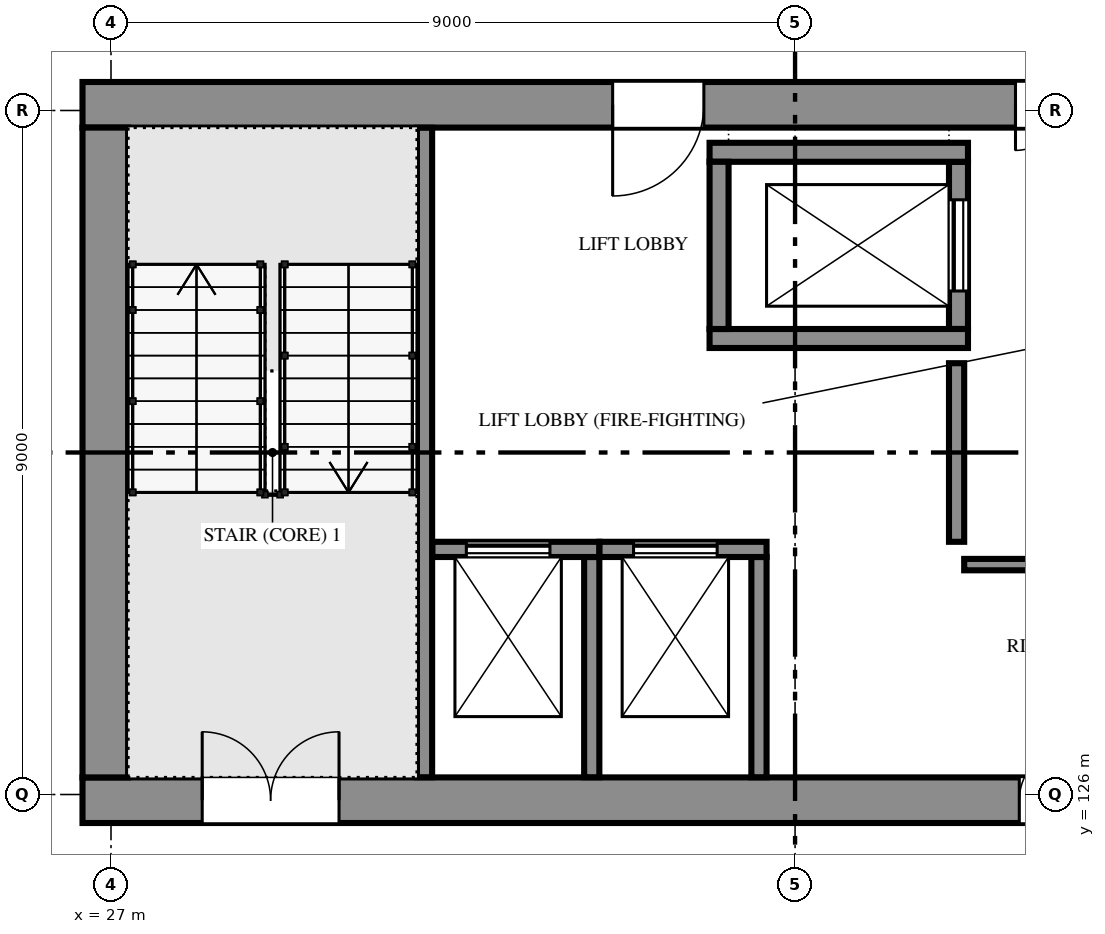
"""IFC4 building model, lengths in metres.
Left out: names, types, materials, properties, quantities, classifications, styles, units other than length and angle.
Written with IfcOpenShell. Run it as: python <this file> out.ifc"""

import sys

from ifc_helpers import new_model, si_unit, direction, frame, frame_2d, origin, place, context, subcontext, project, spatial, polyline, rectangle, outline, extrude, element, fill, save


model = new_model("IFC4")
c1 = context("Model", 3, precision=1e-05, world=origin(), true_north=direction((0.0, 1.0)))
c2 = subcontext(c1, "Body", "Model", "MODEL_VIEW")
j1 = project(units=[si_unit("LENGTHUNIT", "METRE"), si_unit("PLANEANGLEUNIT", "RADIAN")], contexts=[c1])
p1 = place(None, origin())
s1 = spatial("IfcSite", under=j1, at=p1, CompositionType="ELEMENT")
p2 = place(p1, origin())
s2 = spatial("IfcBuilding", under=s1, at=p2, CompositionType="ELEMENT")
p3 = place(p2, origin())
s3 = spatial("IfcBuildingStorey", under=s2, at=p3, CompositionType="ELEMENT", Elevation=0.0)
p4 = place(p3, frame((26.625, 125.925, -2.1), z_axis=(0.0, 0.0, 1.0), x_axis=(1.0, 0.0, 0.0)))
e1 = element("IfcWall", 1, at=p4, inside=s3, PredefinedType="SOLIDWALL", context=c2, shape_type="SweptSolid", body=[
    extrude(rectangle(XDim=18.75, YDim=0.6, at=frame_2d((9.375, 0.0))), origin(), (0.0, 0.0, 1.0), 9.6),
])
p5 = place(p4, frame((1.575, 0.0, 2.1)))
e2 = element("IfcOpeningElement", 2, at=p5, cuts=e1, PredefinedType="OPENING", context=c2, shape_type="SweptSolid", body=[
    extrude(rectangle(XDim=1.8, YDim=2.1, at=frame_2d((0.9, 1.05))), frame((0.0, 0.31, 0.0), z_axis=(0.0, -1.0, 0.0), x_axis=(1.0, 0.0, 0.0)), (0.0, 0.0, 1.0), 0.62),
])
p6 = place(p4, frame((12.325, 0.0, 2.1)))
e3 = element("IfcOpeningElement", 3, at=p6, cuts=e1, PredefinedType="OPENING", context=c2, shape_type="SweptSolid", body=[
    extrude(rectangle(XDim=0.7, YDim=2.0, at=frame_2d((0.35, 1.0))), frame((0.0, 0.31, 0.0), z_axis=(0.0, -1.0, 0.0), x_axis=(1.0, 0.0, 0.0)), (0.0, 0.0, 1.0), 0.62),
])
p7 = place(p3, frame((26.625, 135.075, -2.1), z_axis=(0.0, 0.0, 1.0), x_axis=(1.0, 0.0, 0.0)))
e4 = element("IfcWall", 4, at=p7, inside=s3, PredefinedType="SOLIDWALL", context=c2, shape_type="SweptSolid", body=[
    extrude(rectangle(XDim=18.75, YDim=0.6, at=frame_2d((9.375, 0.0))), origin(), (0.0, 0.0, 1.0), 9.6),
])
p8 = place(p7, frame((15.375, 0.0, 2.1)))
e5 = element("IfcOpeningElement", 5, at=p8, cuts=e4, PredefinedType="OPENING", context=c2, shape_type="SweptSolid", body=[
    extrude(rectangle(XDim=1.8, YDim=2.1, at=frame_2d((0.9, 1.05))), frame((0.0, 0.31, 0.0), z_axis=(0.0, -1.0, 0.0), x_axis=(1.0, 0.0, 0.0)), (0.0, 0.0, 1.0), 0.62),
])
p9 = place(p7, frame((6.975, 0.0, 2.1)))
e6 = element("IfcOpeningElement", 6, at=p9, cuts=e4, PredefinedType="OPENING", context=c2, shape_type="SweptSolid", body=[
    extrude(rectangle(XDim=1.2, YDim=2.1, at=frame_2d((0.6, 1.05))), frame((0.0, 0.31, 0.0), z_axis=(0.0, -1.0, 0.0), x_axis=(1.0, 0.0, 0.0)), (0.0, 0.0, 1.0), 0.62),
])
p10 = place(p7, frame((12.275, 0.0, 2.1)))
e7 = element("IfcOpeningElement", 7, at=p10, cuts=e4, PredefinedType="OPENING", context=c2, shape_type="SweptSolid", body=[
    extrude(rectangle(XDim=1.2, YDim=2.1, at=frame_2d((0.6, 1.05))), frame((0.0, 0.31, 0.0), z_axis=(0.0, -1.0, 0.0), x_axis=(1.0, 0.0, 0.0)), (0.0, 0.0, 1.0), 0.62),
])
p11 = place(p3, frame((26.925, 126.225, -2.1), z_axis=(0.0, 0.0, 1.0), x_axis=(0.0, 1.0, 0.0)))
e8 = element("IfcWall", 8, at=p11, inside=s3, PredefinedType="SOLIDWALL", context=c2, shape_type="SweptSolid", body=[
    extrude(rectangle(XDim=8.55, YDim=0.6, at=frame_2d((4.275, 0.0))), origin(), (0.0, 0.0, 1.0), 9.6),
])
p12 = place(p3, frame((31.125, 126.227, 0.0), z_axis=(0.0, 0.0, 1.0), x_axis=(0.0, 1.0, 0.0)))
e9 = element("IfcWall", 9, at=p12, inside=s3, PredefinedType="SOLIDWALL", context=c2, shape_type="SweptSolid", body=[
    extrude(rectangle(XDim=8.546, YDim=0.2, at=frame_2d((4.273, 0.0))), origin(), (0.0, 0.0, 1.0), 6.836),
])
p13 = place(p3, frame((31.227, 129.225, -1.6), z_axis=(0.0, 0.0, 1.0), x_axis=(1.0, 0.0, 0.0)))
e10 = element("IfcWall", 10, at=p13, inside=s3, PredefinedType="SOLIDWALL", context=c2, shape_type="SweptSolid", body=[
    extrude(rectangle(XDim=2.198, YDim=0.2, at=frame_2d((1.099, 0.0))), origin(), (0.0, 0.0, 1.0), 8.357),
])
p14 = place(p13, frame((0.448, 0.0, 1.6)))
e11 = element("IfcOpeningElement", 11, at=p14, cuts=e10, PredefinedType="OPENING", context=c2, shape_type="SweptSolid", body=[
    extrude(rectangle(XDim=1.1, YDim=2.1, at=frame_2d((0.55, 1.05))), frame((0.0, 0.11, 0.0), z_axis=(0.0, -1.0, 0.0), x_axis=(1.0, 0.0, 0.0)), (0.0, 0.0, 1.0), 0.22),
])
p15 = place(p3, frame((33.325, 126.227, -1.6), z_axis=(0.0, 0.0, 1.0), x_axis=(0.0, 1.0, 0.0)))
e12 = element("IfcWall", 12, at=p15, inside=s3, PredefinedType="SOLIDWALL", context=c2, shape_type="SweptSolid", body=[
    extrude(rectangle(XDim=2.898, YDim=0.2, at=frame_2d((1.449, 0.0))), origin(), (0.0, 0.0, 1.0), 8.357),
])
p16 = place(p3, frame((33.427, 129.225, -1.6), z_axis=(0.0, 0.0, 1.0), x_axis=(1.0, 0.0, 0.0)))
e13 = element("IfcWall", 13, at=p16, inside=s3, PredefinedType="SOLIDWALL", context=c2, shape_type="SweptSolid", body=[
    extrude(rectangle(XDim=2.198, YDim=0.2, at=frame_2d((1.099, 0.0))), origin(), (0.0, 0.0, 1.0), 8.357),
])
p17 = place(p16, frame((0.448, 0.0, 1.6)))
e14 = element("IfcOpeningElement", 14, at=p17, cuts=e13, PredefinedType="OPENING", context=c2, shape_type="SweptSolid", body=[
    extrude(rectangle(XDim=1.1, YDim=2.1, at=frame_2d((0.55, 1.05))), frame((0.0, 0.11, 0.0), z_axis=(0.0, -1.0, 0.0), x_axis=(1.0, 0.0, 0.0)), (0.0, 0.0, 1.0), 0.22),
])
p18 = place(p3, frame((35.525, 126.227, -1.6), z_axis=(0.0, 0.0, 1.0), x_axis=(0.0, 1.0, 0.0)))
e15 = element("IfcWall", 15, at=p18, inside=s3, PredefinedType="SOLIDWALL", context=c2, shape_type="SweptSolid", body=[
    extrude(rectangle(XDim=2.898, YDim=0.2, at=frame_2d((1.449, 0.0))), origin(), (0.0, 0.0, 1.0), 8.357),
])
for number, where, z_axis, x_axis in (
    (16, (34.875, 132.0, -1.6), (0.0, 0.0, 1.0), (1.0, 0.0, 0.0)),
    (17, (34.875, 134.45, -1.6), (0.0, 0.0, 1.0), (1.0, 0.0, 0.0)),
):
    element("IfcWall", number, at=place(p3, frame(where, z_axis=z_axis, x_axis=x_axis)), inside=s3, PredefinedType="SOLIDWALL", context=c2, shape_type="SweptSolid", body=[
        extrude(rectangle(XDim=3.4, YDim=0.25, at=frame_2d((1.7, 0.0))), origin(), (0.0, 0.0, 1.0), 8.436),
    ])
p19 = place(p3, frame((35.0, 132.125, -1.6), z_axis=(0.0, 0.0, 1.0), x_axis=(0.0, 1.0, 0.0)))
e18 = element("IfcWall", 18, at=p19, inside=s3, PredefinedType="SOLIDWALL", context=c2, shape_type="SweptSolid", body=[
    extrude(rectangle(XDim=2.2, YDim=0.25, at=frame_2d((1.1, 0.0))), origin(), (0.0, 0.0, 1.0), 8.436),
])
p20 = place(p3, frame((38.15, 132.125, -1.6), z_axis=(0.0, 0.0, 1.0), x_axis=(0.0, 1.0, 0.0)))
e19 = element("IfcWall", 19, at=p20, inside=s3, PredefinedType="SOLIDWALL", context=c2, shape_type="SweptSolid", body=[
    extrude(rectangle(XDim=2.2, YDim=0.25, at=frame_2d((1.1, 0.0))), origin(), (0.0, 0.0, 1.0), 8.436),
])
p21 = place(p20, frame((0.5, 0.0, 1.6)))
e20 = element("IfcOpeningElement", 20, at=p21, cuts=e19, PredefinedType="OPENING", context=c2, shape_type="SweptSolid", body=[
    extrude(rectangle(XDim=1.2, YDim=2.1, at=frame_2d((0.6, 1.05))), frame((0.0, 0.135, 0.0), z_axis=(0.0, -1.0, 0.0), x_axis=(1.0, 0.0, 0.0)), (0.0, 0.0, 1.0), 0.27),
])
p22 = place(p3, frame((38.125, 131.675, 0.0), z_axis=(0.0, 0.0, 1.0), x_axis=(0.0, -1.0, 0.0)))
e21 = element("IfcWall", 21, at=p22, inside=s3, PredefinedType="PARTITIONING", context=c2, shape_type="SweptSolid", body=[
    extrude(rectangle(XDim=2.35, YDim=0.2, at=frame_2d((1.175, 0.0))), origin(), (0.0, 0.0, 1.0), 6.6),
])
p23 = place(p3, frame((40.773, 129.025, 0.0), z_axis=(0.0, 0.0, 1.0), x_axis=(-1.0, 0.0, 0.0)))
e22 = element("IfcWall", 22, at=p23, inside=s3, PredefinedType="SOLIDWALL", context=c2, shape_type="SweptSolid", body=[
    extrude(rectangle(XDim=2.548, YDim=0.15, at=frame_2d((1.274, 0.0))), origin(), (0.0, 0.0, 1.0), 6.836),
])
p24 = place(p14, origin())
e23 = element("IfcDoor", 23, at=p24, inside=s3, OperationType="SLIDING_TO_LEFT", PredefinedType="DOOR", context=c2, shape_type="SweptSolid", body=[
    extrude(outline(polyline([(0.0, 0.0), (0.07, 0.0), (0.07, 2.03), (1.03, 2.03), (1.03, 0.0), (1.1, 0.0), (1.1, 2.1), (0.0, 2.1), (0.0, 0.0)])), frame((0.0, 0.025, 0.0), z_axis=(0.0, -1.0, 0.0), x_axis=(1.0, 0.0, 0.0)), (0.0, 0.0, 1.0), 0.05),
    extrude(rectangle(XDim=0.524, YDim=2.016, at=frame_2d((0.336, 1.018))), frame((0.0, 0.018, 0.0), z_axis=(0.0, -1.0, 0.0), x_axis=(1.0, 0.0, 0.0)), (0.0, 0.0, 1.0), 0.016),
    extrude(rectangle(XDim=0.52, YDim=2.016, at=frame_2d((0.766, 1.018))), frame((0.0, -0.002, 0.0), z_axis=(0.0, -1.0, 0.0), x_axis=(1.0, 0.0, 0.0)), (0.0, 0.0, 1.0), 0.016),
])
fill(e11, e23)
p25 = place(p17, origin())
e24 = element("IfcDoor", 24, at=p25, inside=s3, OperationType="SLIDING_TO_LEFT", PredefinedType="DOOR", context=c2, shape_type="SweptSolid", body=[
    extrude(outline(polyline([(0.0, 0.0), (0.07, 0.0), (0.07, 2.03), (1.03, 2.03), (1.03, 0.0), (1.1, 0.0), (1.1, 2.1), (0.0, 2.1), (0.0, 0.0)])), frame((0.0, 0.025, 0.0), z_axis=(0.0, -1.0, 0.0), x_axis=(1.0, 0.0, 0.0)), (0.0, 0.0, 1.0), 0.05),
    extrude(rectangle(XDim=0.524, YDim=2.016, at=frame_2d((0.336, 1.018))), frame((0.0, 0.018, 0.0), z_axis=(0.0, -1.0, 0.0), x_axis=(1.0, 0.0, 0.0)), (0.0, 0.0, 1.0), 0.016),
    extrude(rectangle(XDim=0.52, YDim=2.016, at=frame_2d((0.766, 1.018))), frame((0.0, -0.002, 0.0), z_axis=(0.0, -1.0, 0.0), x_axis=(1.0, 0.0, 0.0)), (0.0, 0.0, 1.0), 0.016),
])
fill(e14, e24)
p26 = place(p21, origin())
e25 = element("IfcDoor", 25, at=p26, inside=s3, OperationType="SLIDING_TO_LEFT", PredefinedType="DOOR", context=c2, shape_type="SweptSolid", body=[
    extrude(outline(polyline([(0.0, 0.0), (0.07, 0.0), (0.07, 2.03), (1.13, 2.03), (1.13, 0.0), (1.2, 0.0), (1.2, 2.1), (0.0, 2.1), (0.0, 0.0)])), frame((0.0, 0.025, 0.0), z_axis=(0.0, -1.0, 0.0), x_axis=(1.0, 0.0, 0.0)), (0.0, 0.0, 1.0), 0.05),
    extrude(rectangle(XDim=0.579, YDim=2.016, at=frame_2d((0.363, 1.018))), frame((0.0, 0.018, 0.0), z_axis=(0.0, -1.0, 0.0), x_axis=(1.0, 0.0, 0.0)), (0.0, 0.0, 1.0), 0.016),
    extrude(rectangle(XDim=0.575, YDim=2.016, at=frame_2d((0.839, 1.018))), frame((0.0, -0.002, 0.0), z_axis=(0.0, -1.0, 0.0), x_axis=(1.0, 0.0, 0.0)), (0.0, 0.0, 1.0), 0.016),
])
fill(e20, e25)
p27 = place(p5, origin())
e26 = element("IfcDoor", 26, at=p27, inside=s3, OperationType="DOUBLE_DOOR_SINGLE_SWING", PredefinedType="DOOR", context=c2, shape_type="SweptSolid", body=[
    extrude(outline(polyline([(0.0, 0.0), (0.07, 0.0), (0.07, 2.03), (1.73, 2.03), (1.73, 0.0), (1.8, 0.0), (1.8, 2.1), (0.0, 2.1), (0.0, 0.0)])), frame((0.0, 0.025, 0.0), z_axis=(0.0, -1.0, 0.0), x_axis=(1.0, 0.0, 0.0)), (0.0, 0.0, 1.0), 0.05),
    extrude(outline(polyline([(0.074, 0.01), (0.897, 0.01), (0.897, 2.026), (0.074, 2.026), (0.074, 0.01)]), holes=[polyline([(0.194, 0.16), (0.777, 0.16), (0.777, 1.01), (0.194, 1.01), (0.194, 0.16)]), polyline([(0.335, 1.16), (0.635, 1.16), (0.635, 1.76), (0.335, 1.76), (0.335, 1.16)])]), frame((0.0, 0.017, 0.0), z_axis=(0.0, -1.0, 0.0), x_axis=(1.0, 0.0, 0.0)), (0.0, 0.0, 1.0), 0.035),
    extrude(rectangle(XDim=0.583, YDim=0.85, at=frame_2d((0.485, 0.585))), frame((0.0, 0.009, 0.0), z_axis=(0.0, -1.0, 0.0), x_axis=(1.0, 0.0, 0.0)), (0.0, 0.0, 1.0), 0.017),
    extrude(rectangle(XDim=0.3, YDim=0.6, at=frame_2d((0.485, 1.46))), frame((0.0, 0.006, 0.0), z_axis=(0.0, -1.0, 0.0), x_axis=(1.0, 0.0, 0.0)), (0.0, 0.0, 1.0), 0.012),
    extrude(outline(polyline([(0.903, 0.01), (1.726, 0.01), (1.726, 2.026), (0.903, 2.026), (0.903, 0.01)]), holes=[polyline([(1.023, 0.16), (1.606, 0.16), (1.606, 1.01), (1.023, 1.01), (1.023, 0.16)]), polyline([(1.165, 1.16), (1.465, 1.16), (1.465, 1.76), (1.165, 1.76), (1.165, 1.16)])]), frame((0.0, 0.017, 0.0), z_axis=(0.0, -1.0, 0.0), x_axis=(1.0, 0.0, 0.0)), (0.0, 0.0, 1.0), 0.035),
    extrude(rectangle(XDim=0.583, YDim=0.85, at=frame_2d((1.314, 0.585))), frame((0.0, 0.009, 0.0), z_axis=(0.0, -1.0, 0.0), x_axis=(1.0, 0.0, 0.0)), (0.0, 0.0, 1.0), 0.017),
    extrude(rectangle(XDim=0.3, YDim=0.6, at=frame_2d((1.314, 1.46))), frame((0.0, 0.006, 0.0), z_axis=(0.0, -1.0, 0.0), x_axis=(1.0, 0.0, 0.0)), (0.0, 0.0, 1.0), 0.012),
])
fill(e2, e26)
p28 = place(p9, frame((1.2, 0.0, 0.0), z_axis=(0.0, 0.0, 1.0), x_axis=(-1.0, 0.0, 0.0)))
e27 = element("IfcDoor", 27, at=p28, inside=s3, OperationType="DOUBLE_DOOR_SINGLE_SWING", PredefinedType="DOOR", context=c2, shape_type="SweptSolid", body=[
    extrude(outline(polyline([(0.0, 0.0), (0.07, 0.0), (0.07, 2.03), (1.13, 2.03), (1.13, 0.0), (1.2, 0.0), (1.2, 2.1), (0.0, 2.1), (0.0, 0.0)])), frame((0.0, 0.025, 0.0), z_axis=(0.0, -1.0, 0.0), x_axis=(1.0, 0.0, 0.0)), (0.0, 0.0, 1.0), 0.05),
    extrude(outline(polyline([(0.074, 0.01), (0.597, 0.01), (0.597, 2.026), (0.074, 2.026), (0.074, 0.01)]), holes=[polyline([(0.178, 0.373), (0.492, 0.373), (0.492, 1.784), (0.178, 1.784), (0.178, 0.373)])]), frame((0.0, 0.017, 0.0), z_axis=(0.0, -1.0, 0.0), x_axis=(1.0, 0.0, 0.0)), (0.0, 0.0, 1.0), 0.035),
    extrude(rectangle(XDim=0.314, YDim=1.411, at=frame_2d((0.335, 1.079))), frame((0.0, 0.009, 0.0), z_axis=(0.0, -1.0, 0.0), x_axis=(1.0, 0.0, 0.0)), (0.0, 0.0, 1.0), 0.017),
    extrude(outline(polyline([(0.603, 0.01), (1.126, 0.01), (1.126, 2.026), (0.603, 2.026), (0.603, 0.01)]), holes=[polyline([(0.708, 0.373), (1.021, 0.373), (1.021, 1.784), (0.708, 1.784), (0.708, 0.373)])]), frame((0.0, 0.017, 0.0), z_axis=(0.0, -1.0, 0.0), x_axis=(1.0, 0.0, 0.0)), (0.0, 0.0, 1.0), 0.035),
    extrude(rectangle(XDim=0.314, YDim=1.411, at=frame_2d((0.865, 1.079))), frame((0.0, 0.009, 0.0), z_axis=(0.0, -1.0, 0.0), x_axis=(1.0, 0.0, 0.0)), (0.0, 0.0, 1.0), 0.017),
])
fill(e6, e27)
p29 = place(p10, frame((1.2, 0.0, 0.0), z_axis=(0.0, 0.0, 1.0), x_axis=(-1.0, 0.0, 0.0)))
e28 = element("IfcDoor", 28, at=p29, inside=s3, OperationType="DOUBLE_DOOR_SINGLE_SWING", PredefinedType="DOOR", context=c2, shape_type="SweptSolid", body=[
    extrude(outline(polyline([(0.0, 0.0), (0.07, 0.0), (0.07, 2.03), (1.13, 2.03), (1.13, 0.0), (1.2, 0.0), (1.2, 2.1), (0.0, 2.1), (0.0, 0.0)])), frame((0.0, 0.025, 0.0), z_axis=(0.0, -1.0, 0.0), x_axis=(1.0, 0.0, 0.0)), (0.0, 0.0, 1.0), 0.05),
    extrude(outline(polyline([(0.074, 0.01), (0.597, 0.01), (0.597, 2.026), (0.074, 2.026), (0.074, 0.01)]), holes=[polyline([(0.178, 0.373), (0.492, 0.373), (0.492, 1.784), (0.178, 1.784), (0.178, 0.373)])]), frame((0.0, 0.017, 0.0), z_axis=(0.0, -1.0, 0.0), x_axis=(1.0, 0.0, 0.0)), (0.0, 0.0, 1.0), 0.035),
    extrude(rectangle(XDim=0.314, YDim=1.411, at=frame_2d((0.335, 1.079))), frame((0.0, 0.009, 0.0), z_axis=(0.0, -1.0, 0.0), x_axis=(1.0, 0.0, 0.0)), (0.0, 0.0, 1.0), 0.017),
    extrude(outline(polyline([(0.603, 0.01), (1.126, 0.01), (1.126, 2.026), (0.603, 2.026), (0.603, 0.01)]), holes=[polyline([(0.708, 0.373), (1.021, 0.373), (1.021, 1.784), (0.708, 1.784), (0.708, 0.373)])]), frame((0.0, 0.017, 0.0), z_axis=(0.0, -1.0, 0.0), x_axis=(1.0, 0.0, 0.0)), (0.0, 0.0, 1.0), 0.035),
    extrude(rectangle(XDim=0.314, YDim=1.411, at=frame_2d((0.865, 1.079))), frame((0.0, 0.009, 0.0), z_axis=(0.0, -1.0, 0.0), x_axis=(1.0, 0.0, 0.0)), (0.0, 0.0, 1.0), 0.017),
])
fill(e7, e28)
p30 = place(p6, origin())
e29 = element("IfcDoor", 29, at=p30, inside=s3, OperationType="SINGLE_SWING_RIGHT", PredefinedType="DOOR", context=c2, shape_type="SweptSolid", body=[
    extrude(outline(polyline([(0.0, 0.0), (0.07, 0.0), (0.07, 1.93), (0.63, 1.93), (0.63, 0.0), (0.7, 0.0), (0.7, 2.0), (0.0, 2.0), (0.0, 0.0)])), frame((0.0, 0.025, 0.0), z_axis=(0.0, -1.0, 0.0), x_axis=(1.0, 0.0, 0.0)), (0.0, 0.0, 1.0), 0.05),
    extrude(outline(polyline([(0.074, 0.01), (0.626, 0.01), (0.626, 1.926), (0.074, 1.926), (0.074, 0.01)]), holes=[polyline([(0.184, 0.16), (0.516, 0.16), (0.516, 1.01), (0.184, 1.01), (0.184, 0.16)]), polyline([(0.2, 1.16), (0.5, 1.16), (0.5, 1.76), (0.2, 1.76), (0.2, 1.16)])]), frame((0.0, 0.017, 0.0), z_axis=(0.0, -1.0, 0.0), x_axis=(1.0, 0.0, 0.0)), (0.0, 0.0, 1.0), 0.035),
    extrude(rectangle(XDim=0.331, YDim=0.85, at=frame_2d((0.35, 0.585))), frame((0.0, 0.009, 0.0), z_axis=(0.0, -1.0, 0.0), x_axis=(1.0, 0.0, 0.0)), (0.0, 0.0, 1.0), 0.017),
    extrude(rectangle(XDim=0.3, YDim=0.6, at=frame_2d((0.35, 1.46))), frame((0.0, 0.006, 0.0), z_axis=(0.0, -1.0, 0.0), x_axis=(1.0, 0.0, 0.0)), (0.0, 0.0, 1.0), 0.012),
])
fill(e3, e29)
save(model, sys.argv[1])
